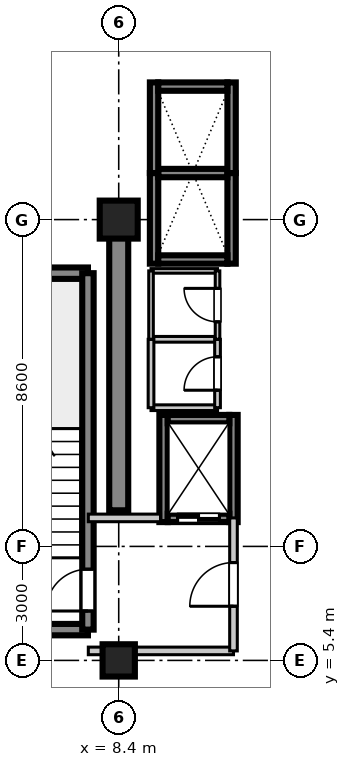
"""IFC4 building model, lengths in metres.
Left out: names, types, materials, properties, quantities, classifications, styles, units other than length and angle.
Written with IfcOpenShell. Run it as: python <this file> out.ifc"""

import sys

from ifc_helpers import new_model, si_unit, direction, frame, frame_2d, origin, origin_2d, place, context, subcontext, project, spatial, rectangle, extrude, source, transform, mapped, element, fill, save


model = new_model("IFC4")
c1 = context("Model", 3, precision=1e-05, world=origin(), true_north=direction((0.0, 1.0)))
c2 = subcontext(c1, "Body", "Model", "MODEL_VIEW")
j1 = project(units=[si_unit("LENGTHUNIT", "METRE"), si_unit("PLANEANGLEUNIT", "RADIAN")], contexts=[c1])
p1 = place(None, origin())
s1 = spatial("IfcSite", under=j1, at=p1, CompositionType="ELEMENT")
p2 = place(p1, origin())
s2 = spatial("IfcBuilding", under=s1, at=p2, CompositionType="ELEMENT")
p3 = place(p2, frame((0.0, 0.0, 241.9)))
s3 = spatial("IfcBuildingStorey", under=s2, at=p3, CompositionType="ELEMENT", Elevation=241.9)
m1 = source(origin(), c2, "Body", "SweptSolid", [
    extrude(rectangle(XDim=0.85, YDim=0.85, at=origin_2d()), origin(), (0.0, 0.0, 1.0), 3.655),
])
p4 = place(p3, frame((8.4, 5.4, 0.0), z_axis=(0.0, 0.0, 1.0), x_axis=(1.0, 0.0, 0.0)))
e1 = element("IfcColumn", 1, at=p4, inside=s3, PredefinedType="PILASTER", context=c2, shape_type="MappedRepresentation", body=[
    mapped(m1, transform((0.0, 0.0, 0.0), scale=1.0)),
])
m2 = source(origin(), c2, "Body", "SweptSolid", [
    extrude(rectangle(XDim=1.0, YDim=1.0, at=origin_2d()), origin(), (0.0, 0.0, 1.0), 3.655),
])
p5 = place(p3, frame((8.4, 17.0, 0.0), z_axis=(0.0, 0.0, 1.0), x_axis=(1.0, 0.0, 0.0)))
e2 = element("IfcColumn", 2, at=p5, inside=s3, PredefinedType="COLUMN", context=c2, shape_type="MappedRepresentation", body=[
    mapped(m2, transform((0.0, 0.0, 0.0), scale=1.0)),
])
m3 = source(origin(), c2, "Body", "SweptSolid", [
    extrude(rectangle(XDim=7.65, YDim=0.5, at=frame_2d((3.825, 0.0))), origin(), (0.0, 0.0, 1.0), 3.41),
])
p6 = place(p3, frame((8.4, 9.35, 0.0), z_axis=(0.0, 0.0, 1.0), x_axis=(0.0, 1.0, 0.0)))
e3 = element("IfcWall", 3, at=p6, inside=s3, PredefinedType="SHEAR", context=c2, shape_type="MappedRepresentation", body=[
    mapped(m3, transform((0.0, 0.0, 0.0), scale=1.0)),
])
m4 = source(origin(), c2, "Body", "SweptSolid", [
    extrude(rectangle(XDim=3.98, YDim=0.3, at=frame_2d((1.99, 0.0))), origin(), (0.0, 0.0, 1.0), 3.41),
])
for number, where, z_axis, x_axis in (
    (4, (3.61, 6.21, 0.0), (0.0, 0.0, 1.0), (1.0, 0.0, 0.0)),
    (5, (3.61, 15.59, 0.0), (0.0, 0.0, 1.0), (1.0, 0.0, 0.0)),
):
    element("IfcWall", number, at=place(p3, frame(where, z_axis=z_axis, x_axis=x_axis)), inside=s3, PredefinedType="SHEAR", context=c2, shape_type="MappedRepresentation", body=[
        mapped(m4, transform((0.0, 0.0, 0.0), scale=1.0)),
    ])
m5 = source(origin(), c2, "Body", "SweptSolid", [
    extrude(rectangle(XDim=9.38, YDim=0.3, at=frame_2d((4.69, 0.0))), origin(), (0.0, 0.0, 1.0), 3.41),
])
p7 = place(p3, frame((7.59, 6.21, 0.0), z_axis=(0.0, 0.0, 1.0), x_axis=(0.0, 1.0, 0.0)))
e6 = element("IfcWall", 6, at=p7, inside=s3, PredefinedType="SHEAR", context=c2, shape_type="MappedRepresentation", body=[
    mapped(m5, transform((0.0, 0.0, 0.0), scale=1.0)),
])
p8 = place(p7, frame((0.49, 0.0, 0.0)))
e7 = element("IfcOpeningElement", 7, at=p8, cuts=e6, PredefinedType="OPENING", context=c2, shape_type="SweptSolid", body=[
    extrude(rectangle(XDim=1.1, YDim=2.15, at=frame_2d((0.55, 1.075))), frame((0.0, 0.16, 0.0), z_axis=(0.0, -1.0, 0.0), x_axis=(1.0, 0.0, 0.0)), (0.0, 0.0, 1.0), 0.32),
])
m6 = source(origin(), c2, "Body", "SweptSolid", [
    extrude(rectangle(XDim=2.385, YDim=0.22, at=frame_2d((1.192, 0.0))), origin(), (0.0, 0.0, 1.0), 3.41),
])
for number, where, z_axis, x_axis in (
    (8, (9.33, 15.84, 0.0), (0.0, 0.0, 1.0), (0.0, 1.0, 0.0)),
    (9, (11.37, 15.84, 0.0), (0.0, 0.0, 1.0), (0.0, 1.0, 0.0)),
):
    element("IfcWall", number, at=place(p3, frame(where, z_axis=z_axis, x_axis=x_axis)), inside=s3, PredefinedType="SHEAR", context=c2, shape_type="MappedRepresentation", body=[
        mapped(m6, transform((0.0, 0.0, 0.0), scale=1.0)),
    ])
m7 = source(origin(), c2, "Body", "SweptSolid", [
    extrude(rectangle(XDim=1.82, YDim=0.22, at=frame_2d((0.91, 0.0))), origin(), (0.0, 0.0, 1.0), 3.41),
])
p9 = place(p3, frame((9.44, 15.95, 0.0), z_axis=(0.0, 0.0, 1.0), x_axis=(1.0, 0.0, 0.0)))
e10 = element("IfcWall", 10, at=p9, inside=s3, PredefinedType="SHEAR", context=c2, shape_type="MappedRepresentation", body=[
    mapped(m7, transform((0.0, 0.0, 0.0), scale=1.0)),
])
m8 = source(origin(), c2, "Body", "SweptSolid", [
    extrude(rectangle(XDim=1.82, YDim=0.22, at=frame_2d((0.91, 0.0))), origin(), (0.0, 0.0, 1.0), 3.7),
])
p10 = place(p3, frame((9.44, 18.225, 0.0), z_axis=(0.0, 0.0, 1.0), x_axis=(1.0, 0.0, 0.0)))
e11 = element("IfcWall", 11, at=p10, inside=s3, PredefinedType="SHEAR", context=c2, shape_type="MappedRepresentation", body=[
    mapped(m8, transform((0.0, 0.0, 0.0), scale=1.0)),
])
for number, where, z_axis, x_axis in (
    (12, (9.33, 18.225, 0.0), (0.0, 0.0, 1.0), (0.0, 1.0, 0.0)),
    (13, (11.37, 18.225, 0.0), (0.0, 0.0, 1.0), (0.0, 1.0, 0.0)),
):
    element("IfcWall", number, at=place(p3, frame(where, z_axis=z_axis, x_axis=x_axis)), inside=s3, PredefinedType="SHEAR", context=c2, shape_type="MappedRepresentation", body=[
        mapped(m6, transform((0.0, 0.0, 0.0), scale=1.0)),
    ])
p11 = place(p3, frame((9.44, 20.5, 0.0), z_axis=(0.0, 0.0, 1.0), x_axis=(1.0, 0.0, 0.0)))
e14 = element("IfcWall", 14, at=p11, inside=s3, PredefinedType="SHEAR", context=c2, shape_type="MappedRepresentation", body=[
    mapped(m7, transform((0.0, 0.0, 0.0), scale=1.0)),
])
m9 = source(origin(), c2, "Body", "SweptSolid", [
    extrude(rectangle(XDim=2.82, YDim=0.22, at=frame_2d((1.41, 0.0))), origin(), (0.0, 0.0, 1.0), 3.41),
])
for number, where, z_axis, x_axis in (
    (15, (9.58, 9.04, 0.0), (0.0, 0.0, 1.0), (0.0, 1.0, 0.0)),
    (16, (11.42, 9.04, 0.0), (0.0, 0.0, 1.0), (0.0, 1.0, 0.0)),
):
    element("IfcWall", number, at=place(p3, frame(where, z_axis=z_axis, x_axis=x_axis)), inside=s3, PredefinedType="SHEAR", context=c2, shape_type="MappedRepresentation", body=[
        mapped(m9, transform((0.0, 0.0, 0.0), scale=1.0)),
    ])
m10 = source(origin(), c2, "Body", "SweptSolid", [
    extrude(rectangle(XDim=1.62, YDim=0.22, at=frame_2d((0.81, 0.0))), origin(), (0.0, 0.0, 1.0), 3.41),
])
p12 = place(p3, frame((9.69, 9.15, 0.0), z_axis=(0.0, 0.0, 1.0), x_axis=(1.0, 0.0, 0.0)))
e17 = element("IfcWall", 17, at=p12, inside=s3, PredefinedType="SHEAR", context=c2, shape_type="MappedRepresentation", body=[
    mapped(m10, transform((0.0, 0.0, 0.0), scale=1.0)),
])
p13 = place(p12, frame((0.26, 0.0, 0.0)))
e18 = element("IfcOpeningElement", 18, at=p13, cuts=e17, PredefinedType="OPENING", context=c2, shape_type="SweptSolid", body=[
    extrude(rectangle(XDim=1.1, YDim=2.2, at=frame_2d((0.55, 1.1))), frame((0.0, 0.12, 0.0), z_axis=(0.0, -1.0, 0.0), x_axis=(1.0, 0.0, 0.0)), (0.0, 0.0, 1.0), 0.24),
])
p14 = place(p3, frame((9.69, 11.75, 0.0), z_axis=(0.0, 0.0, 1.0), x_axis=(1.0, 0.0, 0.0)))
e19 = element("IfcWall", 19, at=p14, inside=s3, PredefinedType="SHEAR", context=c2, shape_type="MappedRepresentation", body=[
    mapped(m10, transform((0.0, 0.0, 0.0), scale=1.0)),
])
m11 = source(origin(), c2, "Body", "SweptSolid", [
    extrude(rectangle(XDim=3.82, YDim=0.2, at=frame_2d((1.91, 0.0))), origin(), (0.0, 0.0, 1.0), 2.75),
])
p15 = place(p3, frame((7.6, 5.65, 0.0), z_axis=(0.0, 0.0, 1.0), x_axis=(1.0, 0.0, 0.0)))
e20 = element("IfcWall", 20, at=p15, inside=s3, PredefinedType="PARTITIONING", context=c2, shape_type="MappedRepresentation", body=[
    mapped(m11, transform((0.0, 0.0, 0.0), scale=1.0)),
])
m12 = source(origin(), c2, "Body", "SweptSolid", [
    extrude(rectangle(XDim=1.9, YDim=0.2, at=frame_2d((0.95, 0.0))), origin(), (0.0, 0.0, 1.0), 2.75),
])
p16 = place(p3, frame((7.6, 9.15, 0.0), z_axis=(0.0, 0.0, 1.0), x_axis=(1.0, 0.0, 0.0)))
e21 = element("IfcWall", 21, at=p16, inside=s3, PredefinedType="PARTITIONING", context=c2, shape_type="MappedRepresentation", body=[
    mapped(m12, transform((0.0, 0.0, 0.0), scale=1.0)),
])
m13 = source(origin(), c2, "Body", "SweptSolid", [
    extrude(rectangle(XDim=3.5, YDim=0.2, at=frame_2d((1.75, 0.0))), origin(), (0.0, 0.0, 1.0), 2.75),
])
p17 = place(p3, frame((11.42, 5.65, 0.0), z_axis=(0.0, 0.0, 1.0), x_axis=(0.0, 1.0, 0.0)))
e22 = element("IfcWall", 22, at=p17, inside=s3, PredefinedType="PARTITIONING", context=c2, shape_type="MappedRepresentation", body=[
    mapped(m13, transform((0.0, 0.0, 0.0), scale=1.0)),
])
p18 = place(p17, frame((1.175, 0.0, 0.0)))
e23 = element("IfcOpeningElement", 23, at=p18, cuts=e22, PredefinedType="OPENING", context=c2, shape_type="SweptSolid", body=[
    extrude(rectangle(XDim=1.15, YDim=2.15, at=frame_2d((0.575, 1.075))), frame((0.0, 0.11, 0.0), z_axis=(0.0, -1.0, 0.0), x_axis=(1.0, 0.0, 0.0)), (0.0, 0.0, 1.0), 0.22),
])
m14 = source(origin(), c2, "Body", "SweptSolid", [
    extrude(rectangle(XDim=1.75, YDim=0.15, at=frame_2d((0.875, 0.0))), origin(), (0.0, 0.0, 1.0), 2.75),
])
for number, where, z_axis, x_axis in (
    (24, (9.25, 12.05, 0.0), (0.0, 0.0, 1.0), (1.0, 0.0, 0.0)),
    (25, (9.25, 13.85, 0.0), (0.0, 0.0, 1.0), (1.0, 0.0, 0.0)),
):
    element("IfcWall", number, at=place(p3, frame(where, z_axis=z_axis, x_axis=x_axis)), inside=s3, PredefinedType="PARTITIONING", context=c2, shape_type="MappedRepresentation", body=[
        mapped(m14, transform((0.0, 0.0, 0.0), scale=1.0)),
    ])
m15 = source(origin(), c2, "Body", "SweptSolid", [
    extrude(rectangle(XDim=1.8, YDim=0.15, at=frame_2d((0.9, 0.0))), origin(), (0.0, 0.0, 1.0), 2.75),
])
p19 = place(p3, frame((9.25, 12.05, 0.0), z_axis=(0.0, 0.0, 1.0), x_axis=(0.0, 1.0, 0.0)))
e26 = element("IfcWall", 26, at=p19, inside=s3, PredefinedType="PARTITIONING", context=c2, shape_type="MappedRepresentation", body=[
    mapped(m15, transform((0.0, 0.0, 0.0), scale=1.0)),
])
p20 = place(p3, frame((11.0, 12.05, 0.0), z_axis=(0.0, 0.0, 1.0), x_axis=(0.0, 1.0, 0.0)))
e27 = element("IfcWall", 27, at=p20, inside=s3, PredefinedType="PARTITIONING", context=c2, shape_type="MappedRepresentation", body=[
    mapped(m15, transform((0.0, 0.0, 0.0), scale=1.0)),
])
p21 = place(p20, frame((0.46, 0.0, 0.0)))
e28 = element("IfcOpeningElement", 28, at=p21, cuts=e27, PredefinedType="OPENING", context=c2, shape_type="SweptSolid", body=[
    extrude(rectangle(XDim=0.88, YDim=2.1, at=frame_2d((0.44, 1.05))), frame((0.0, 0.085, 0.0), z_axis=(0.0, -1.0, 0.0), x_axis=(1.0, 0.0, 0.0)), (0.0, 0.0, 1.0), 0.17),
])
m16 = source(origin(), c2, "Body", "SweptSolid", [
    extrude(rectangle(XDim=1.75, YDim=0.12, at=frame_2d((0.875, 0.0))), origin(), (0.0, 0.0, 1.0), 2.75),
])
p22 = place(p3, frame((9.25, 15.65, 0.0), z_axis=(0.0, 0.0, 1.0), x_axis=(1.0, 0.0, 0.0)))
e29 = element("IfcWall", 29, at=p22, inside=s3, PredefinedType="PARTITIONING", context=c2, shape_type="MappedRepresentation", body=[
    mapped(m16, transform((0.0, 0.0, 0.0), scale=1.0)),
])
m17 = source(origin(), c2, "Body", "SweptSolid", [
    extrude(rectangle(XDim=1.8, YDim=0.12, at=frame_2d((0.9, 0.0))), origin(), (0.0, 0.0, 1.0), 2.75),
])
p23 = place(p3, frame((9.25, 13.85, 0.0), z_axis=(0.0, 0.0, 1.0), x_axis=(0.0, 1.0, 0.0)))
e30 = element("IfcWall", 30, at=p23, inside=s3, PredefinedType="PARTITIONING", context=c2, shape_type="MappedRepresentation", body=[
    mapped(m17, transform((0.0, 0.0, 0.0), scale=1.0)),
])
p24 = place(p3, frame((11.0, 13.85, 0.0), z_axis=(0.0, 0.0, 1.0), x_axis=(0.0, 1.0, 0.0)))
e31 = element("IfcWall", 31, at=p24, inside=s3, PredefinedType="PARTITIONING", context=c2, shape_type="MappedRepresentation", body=[
    mapped(m17, transform((0.0, 0.0, 0.0), scale=1.0)),
])
p25 = place(p24, frame((0.46, 0.0, 0.0)))
e32 = element("IfcOpeningElement", 32, at=p25, cuts=e31, PredefinedType="OPENING", context=c2, shape_type="SweptSolid", body=[
    extrude(rectangle(XDim=0.88, YDim=2.1, at=frame_2d((0.44, 1.05))), frame((0.0, 0.07, 0.0), z_axis=(0.0, -1.0, 0.0), x_axis=(1.0, 0.0, 0.0)), (0.0, 0.0, 1.0), 0.14),
])
m18 = source(origin(), c2, "Body", "SweptSolid", [
    extrude(rectangle(XDim=1.1, YDim=2.15, at=frame_2d((0.55, 1.075))), frame((0.0, 0.025, 0.0), z_axis=(0.0, -1.0, 0.0), x_axis=(1.0, 0.0, 0.0)), (0.0, 0.0, 1.0), 0.05),
])
p26 = place(p8, origin())
e33 = element("IfcDoor", 33, at=p26, inside=s3, OperationType="SINGLE_SWING_LEFT", PredefinedType="DOOR", context=c2, shape_type="MappedRepresentation", body=[
    mapped(m18, transform((0.0, 0.0, 0.0), scale=1.0)),
])
fill(e7, e33)
m19 = source(origin(), c2, "Body", "SweptSolid", [
    extrude(rectangle(XDim=1.1, YDim=2.2, at=frame_2d((0.55, 1.1))), frame((0.0, 0.025, 0.0), z_axis=(0.0, -1.0, 0.0), x_axis=(1.0, 0.0, 0.0)), (0.0, 0.0, 1.0), 0.05),
])
p27 = place(p13, frame((1.1, 0.0, 0.0), z_axis=(0.0, 0.0, 1.0), x_axis=(-1.0, 0.0, 0.0)))
e34 = element("IfcDoor", 34, at=p27, inside=s3, OperationType="DOUBLE_DOOR_SLIDING", PredefinedType="DOOR", context=c2, shape_type="MappedRepresentation", body=[
    mapped(m19, transform((0.0, 0.0, 0.0), scale=1.0)),
])
fill(e18, e34)
m20 = source(origin(), c2, "Body", "SweptSolid", [
    extrude(rectangle(XDim=1.15, YDim=2.15, at=frame_2d((0.575, 1.075))), frame((0.0, 0.025, 0.0), z_axis=(0.0, -1.0, 0.0), x_axis=(1.0, 0.0, 0.0)), (0.0, 0.0, 1.0), 0.05),
])
p28 = place(p18, frame((1.15, 0.0, 0.0), z_axis=(0.0, 0.0, 1.0), x_axis=(-1.0, 0.0, 0.0)))
e35 = element("IfcDoor", 35, at=p28, inside=s3, OperationType="SINGLE_SWING_LEFT", PredefinedType="DOOR", context=c2, shape_type="MappedRepresentation", body=[
    mapped(m20, transform((0.0, 0.0, 0.0), scale=1.0)),
])
fill(e23, e35)
m21 = source(origin(), c2, "Body", "SweptSolid", [
    extrude(rectangle(XDim=0.88, YDim=2.1, at=frame_2d((0.44, 1.05))), frame((0.0, 0.025, 0.0), z_axis=(0.0, -1.0, 0.0), x_axis=(1.0, 0.0, 0.0)), (0.0, 0.0, 1.0), 0.05),
])
p29 = place(p21, origin())
e36 = element("IfcDoor", 36, at=p29, inside=s3, OperationType="SINGLE_SWING_LEFT", PredefinedType="DOOR", context=c2, shape_type="MappedRepresentation", body=[
    mapped(m21, transform((0.0, 0.0, 0.0), scale=1.0)),
])
fill(e28, e36)
p30 = place(p25, origin())
e37 = element("IfcDoor", 37, at=p30, inside=s3, OperationType="SINGLE_SWING_RIGHT", PredefinedType="DOOR", context=c2, shape_type="MappedRepresentation", body=[
    mapped(m21, transform((0.0, 0.0, 0.0), scale=1.0)),
])
fill(e32, e37)
save(model, sys.argv[1])
